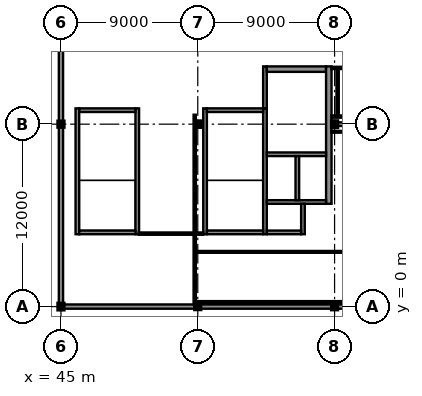
"""IFC4 building model, lengths in metres.
Left out: names, types, materials, properties, quantities, classifications, styles, units other than length and angle.
Written with IfcOpenShell. Run it as: python <this file> out.ifc"""

import sys

from ifc_helpers import new_model, si_unit, direction, frame, frame_2d, origin, origin_2d, place, context, subcontext, project, spatial, rectangle, i_section, extrude, element, fill, save


model = new_model("IFC4")
c1 = context("Model", 3, precision=1e-05, world=origin(), true_north=direction((0.0, 1.0)))
c2 = subcontext(c1, "Body", "Model", "MODEL_VIEW")
j1 = project(units=[si_unit("LENGTHUNIT", "METRE"), si_unit("PLANEANGLEUNIT", "RADIAN")], contexts=[c1])
p1 = place(None, origin())
s1 = spatial("IfcSite", under=j1, at=p1, CompositionType="ELEMENT")
p2 = place(p1, origin())
s2 = spatial("IfcBuilding", under=s1, at=p2, CompositionType="ELEMENT")
p3 = place(p2, frame((0.0, 0.0, 23.4)))
s3 = spatial("IfcBuildingStorey", under=s2, at=p3, CompositionType="ELEMENT", Elevation=23.4)
p4 = place(p3, frame((45.0, 0.0, 0.0), z_axis=(0.0, 0.0, 1.0), x_axis=(0.0, 1.0, 0.0)))
e1 = element("IfcColumn", 1, at=p4, inside=s3, PredefinedType="COLUMN", context=c2, shape_type="SweptSolid", body=[
    extrude(i_section(OverallWidth=0.3, OverallDepth=0.34, WebThickness=0.012, FlangeThickness=0.021, at=origin_2d()), origin(), (0.0, 0.0, 1.0), 4.0),
])
for number, where, z_axis, x_axis in (
    (2, (45.0, 12.0, 0.0), (0.0, 0.0, 1.0), (1.0, 0.0, 0.0)),
    (3, (54.0, 0.0, 0.0), (0.0, 0.0, 1.0), (1.0, 0.0, 0.0)),
):
    element("IfcColumn", number, at=place(p3, frame(where, z_axis=z_axis, x_axis=x_axis)), inside=s3, PredefinedType="COLUMN", context=c2, shape_type="SweptSolid", body=[
        extrude(i_section(OverallWidth=0.3, OverallDepth=0.3, WebThickness=0.011, FlangeThickness=0.019, at=origin_2d()), origin(), (0.0, 0.0, 1.0), 4.0),
    ])
for number, where, z_axis, x_axis in (
    (4, (54.0, 12.0, 0.0), (0.0, 0.0, 1.0), (1.0, 0.0, 0.0)),
    (5, (63.0, 0.0, 0.0), (0.0, 0.0, 1.0), (1.0, 0.0, 0.0)),
):
    element("IfcColumn", number, at=place(p3, frame(where, z_axis=z_axis, x_axis=x_axis)), inside=s3, PredefinedType="COLUMN", context=c2, shape_type="SweptSolid", body=[
        extrude(i_section(OverallWidth=0.3, OverallDepth=0.32, WebThickness=0.011, FlangeThickness=0.021, at=origin_2d()), origin(), (0.0, 0.0, 1.0), 4.0),
    ])
p5 = place(p3, frame((63.0, 12.0, 0.0), z_axis=(0.0, 0.0, 1.0), x_axis=(1.0, 0.0, 0.0)))
e6 = element("IfcColumn", 6, at=p5, inside=s3, PredefinedType="COLUMN", context=c2, shape_type="SweptSolid", body=[
    extrude(i_section(OverallWidth=0.3, OverallDepth=0.34, WebThickness=0.012, FlangeThickness=0.021, at=origin_2d()), origin(), (0.0, 0.0, 1.0), 4.0),
])
p6 = place(p3, frame((45.168, 0.0, 0.0), z_axis=(0.0, 0.0, 1.0), x_axis=(1.0, 0.0, 0.0)))
e7 = element("IfcWall", 7, at=p6, inside=s3, PredefinedType="SOLIDWALL", context=c2, shape_type="SweptSolid", body=[
    extrude(rectangle(XDim=8.824, YDim=0.28, at=frame_2d((4.412, 0.0))), origin(), (0.0, 0.0, 1.0), 2.747),
])
p7 = place(p6, frame((1.997, 0.0, 0.9)))
e8 = element("IfcOpeningElement", 8, at=p7, cuts=e7, PredefinedType="OPENING", context=c2, shape_type="SweptSolid", body=[
    extrude(rectangle(XDim=1.3, YDim=1.3, at=frame_2d((0.65, 0.65))), frame((0.0, 0.155, 0.0), z_axis=(0.0, -1.0, 0.0), x_axis=(1.0, 0.0, 0.0)), (0.0, 0.0, 1.0), 0.31),
])
p8 = place(p6, frame((5.527, 0.0, 0.9)))
e9 = element("IfcOpeningElement", 9, at=p8, cuts=e7, PredefinedType="OPENING", context=c2, shape_type="SweptSolid", body=[
    extrude(rectangle(XDim=1.3, YDim=1.3, at=frame_2d((0.65, 0.65))), frame((0.0, 0.155, 0.0), z_axis=(0.0, -1.0, 0.0), x_axis=(1.0, 0.0, 0.0)), (0.0, 0.0, 1.0), 0.31),
])
p9 = place(p3, frame((54.008, 0.0, 0.0), z_axis=(0.0, 0.0, 1.0), x_axis=(1.0, 0.0, 0.0)))
e10 = element("IfcWall", 10, at=p9, inside=s3, PredefinedType="SOLIDWALL", context=c2, shape_type="SweptSolid", body=[
    extrude(rectangle(XDim=8.984, YDim=0.28, at=frame_2d((4.492, 0.0))), origin(), (0.0, 0.0, 1.0), 2.747),
])
p10 = place(p9, frame((2.045, 0.0, 0.9)))
e11 = element("IfcOpeningElement", 11, at=p10, cuts=e10, PredefinedType="OPENING", context=c2, shape_type="SweptSolid", body=[
    extrude(rectangle(XDim=1.3, YDim=1.3, at=frame_2d((0.65, 0.65))), frame((0.0, 0.155, 0.0), z_axis=(0.0, -1.0, 0.0), x_axis=(1.0, 0.0, 0.0)), (0.0, 0.0, 1.0), 0.31),
])
p11 = place(p9, frame((5.639, 0.0, 0.9)))
e12 = element("IfcOpeningElement", 12, at=p11, cuts=e10, PredefinedType="OPENING", context=c2, shape_type="SweptSolid", body=[
    extrude(rectangle(XDim=1.3, YDim=1.3, at=frame_2d((0.65, 0.65))), frame((0.0, 0.155, 0.0), z_axis=(0.0, -1.0, 0.0), x_axis=(1.0, 0.0, 0.0)), (0.0, 0.0, 1.0), 0.31),
])
p12 = place(p3, frame((63.008, 0.0, 0.0), z_axis=(0.0, 0.0, 1.0), x_axis=(1.0, 0.0, 0.0)))
e13 = element("IfcWall", 13, at=p12, inside=s3, PredefinedType="SOLIDWALL", context=c2, shape_type="SweptSolid", body=[
    extrude(rectangle(XDim=8.984, YDim=0.28, at=frame_2d((4.492, 0.0))), origin(), (0.0, 0.0, 1.0), 2.747),
])
p13 = place(p12, frame((2.045, 0.0, 0.9)))
e14 = element("IfcOpeningElement", 14, at=p13, cuts=e13, PredefinedType="OPENING", context=c2, shape_type="SweptSolid", body=[
    extrude(rectangle(XDim=1.3, YDim=1.3, at=frame_2d((0.65, 0.65))), frame((0.0, 0.155, 0.0), z_axis=(0.0, -1.0, 0.0), x_axis=(1.0, 0.0, 0.0)), (0.0, 0.0, 1.0), 0.31),
])
p14 = place(p12, frame((5.639, 0.0, 0.9)))
e15 = element("IfcOpeningElement", 15, at=p14, cuts=e13, PredefinedType="OPENING", context=c2, shape_type="SweptSolid", body=[
    extrude(rectangle(XDim=1.3, YDim=1.3, at=frame_2d((0.65, 0.65))), frame((0.0, 0.155, 0.0), z_axis=(0.0, -1.0, 0.0), x_axis=(1.0, 0.0, 0.0)), (0.0, 0.0, 1.0), 0.31),
])
p15 = place(p3, frame((45.0, 23.677, 0.0), z_axis=(0.0, 0.0, 1.0), x_axis=(0.0, -1.0, 0.0)))
e16 = element("IfcWall", 16, at=p15, inside=s3, PredefinedType="SOLIDWALL", context=c2, shape_type="SweptSolid", body=[
    extrude(rectangle(XDim=11.529, YDim=0.28, at=frame_2d((5.765, 0.0))), origin(), (0.0, 0.0, 1.0), 3.155),
])
p16 = place(p15, frame((2.809, 0.0, 0.9)))
e17 = element("IfcOpeningElement", 17, at=p16, cuts=e16, PredefinedType="OPENING", context=c2, shape_type="SweptSolid", body=[
    extrude(rectangle(XDim=1.3, YDim=1.3, at=frame_2d((0.65, 0.65))), frame((0.0, 0.155, 0.0), z_axis=(0.0, -1.0, 0.0), x_axis=(1.0, 0.0, 0.0)), (0.0, 0.0, 1.0), 0.31),
])
p17 = place(p15, frame((8.117, 0.0, 0.9)))
e18 = element("IfcOpeningElement", 18, at=p17, cuts=e16, PredefinedType="OPENING", context=c2, shape_type="SweptSolid", body=[
    extrude(rectangle(XDim=1.3, YDim=1.3, at=frame_2d((0.65, 0.65))), frame((0.0, 0.155, 0.0), z_axis=(0.0, -1.0, 0.0), x_axis=(1.0, 0.0, 0.0)), (0.0, 0.0, 1.0), 0.31),
])
p18 = place(p3, frame((45.0, 11.852, 0.0), z_axis=(0.0, 0.0, 1.0), x_axis=(0.0, -1.0, 0.0)))
e19 = element("IfcWall", 19, at=p18, inside=s3, PredefinedType="SOLIDWALL", context=c2, shape_type="SweptSolid", body=[
    extrude(rectangle(XDim=11.844, YDim=0.28, at=frame_2d((5.922, 0.0))), origin(), (0.0, 0.0, 1.0), 3.155),
])
p19 = place(p18, frame((2.903, 0.0, 0.9)))
e20 = element("IfcOpeningElement", 20, at=p19, cuts=e19, PredefinedType="OPENING", context=c2, shape_type="SweptSolid", body=[
    extrude(rectangle(XDim=1.3, YDim=1.3, at=frame_2d((0.65, 0.65))), frame((0.0, 0.155, 0.0), z_axis=(0.0, -1.0, 0.0), x_axis=(1.0, 0.0, 0.0)), (0.0, 0.0, 1.0), 0.31),
])
p20 = place(p18, frame((7.641, 0.0, 0.9)))
e21 = element("IfcOpeningElement", 21, at=p20, cuts=e19, PredefinedType="OPENING", context=c2, shape_type="SweptSolid", body=[
    extrude(rectangle(XDim=1.3, YDim=1.3, at=frame_2d((0.65, 0.65))), frame((0.0, 0.155, 0.0), z_axis=(0.0, -1.0, 0.0), x_axis=(1.0, 0.0, 0.0)), (0.0, 0.0, 1.0), 0.31),
])
p21 = place(p3, frame((54.48, 4.76, 0.0), z_axis=(0.0, 0.0, 1.0), x_axis=(0.0, 1.0, 0.0)))
e22 = element("IfcWall", 22, at=p21, inside=s3, PredefinedType="SHEAR", context=c2, shape_type="SweptSolid", body=[
    extrude(rectangle(XDim=8.28, YDim=0.24, at=frame_2d((4.14, 0.0))), origin(), (0.0, 0.0, 1.0), 3.81),
])
p22 = place(p3, frame((58.42, 4.76, 0.0), z_axis=(0.0, 0.0, 1.0), x_axis=(0.0, 1.0, 0.0)))
e23 = element("IfcWall", 23, at=p22, inside=s3, PredefinedType="SHEAR", context=c2, shape_type="SweptSolid", body=[
    extrude(rectangle(XDim=8.28, YDim=0.24, at=frame_2d((4.14, 0.0))), origin(), (0.0, 0.0, 1.0), 3.81),
])
p23 = place(p22, frame((6.49, 0.0, 0.0)))
e24 = element("IfcOpeningElement", 24, at=p23, cuts=e23, PredefinedType="OPENING", context=c2, shape_type="SweptSolid", body=[
    extrude(rectangle(XDim=1.3, YDim=2.2, at=frame_2d((0.65, 1.1))), frame((0.0, 0.135, 0.0), z_axis=(0.0, -1.0, 0.0), x_axis=(1.0, 0.0, 0.0)), (0.0, 0.0, 1.0), 0.27),
])
for number, where, z_axis, x_axis in (
    (25, (54.6, 4.88, 0.0), (0.0, 0.0, 1.0), (1.0, 0.0, 0.0)),
    (26, (54.6, 12.92, 0.0), (0.0, 0.0, 1.0), (1.0, 0.0, 0.0)),
):
    element("IfcWall", number, at=place(p3, frame(where, z_axis=z_axis, x_axis=x_axis)), inside=s3, PredefinedType="SHEAR", context=c2, shape_type="SweptSolid", body=[
        extrude(rectangle(XDim=3.7, YDim=0.24, at=frame_2d((1.85, 0.0))), origin(), (0.0, 0.0, 1.0), 3.81),
    ])
p24 = place(p3, frame((46.08, 4.76, 0.0), z_axis=(0.0, 0.0, 1.0), x_axis=(0.0, 1.0, 0.0)))
e27 = element("IfcWall", 27, at=p24, inside=s3, PredefinedType="SHEAR", context=c2, shape_type="SweptSolid", body=[
    extrude(rectangle(XDim=8.28, YDim=0.24, at=frame_2d((4.14, 0.0))), origin(), (0.0, 0.0, 1.0), 3.81),
])
p25 = place(p3, frame((50.02, 4.76, 0.0), z_axis=(0.0, 0.0, 1.0), x_axis=(0.0, 1.0, 0.0)))
e28 = element("IfcWall", 28, at=p25, inside=s3, PredefinedType="SHEAR", context=c2, shape_type="SweptSolid", body=[
    extrude(rectangle(XDim=8.28, YDim=0.24, at=frame_2d((4.14, 0.0))), origin(), (0.0, 0.0, 1.0), 3.81),
])
p26 = place(p25, frame((6.49, 0.0, 0.0)))
e29 = element("IfcOpeningElement", 29, at=p26, cuts=e28, PredefinedType="OPENING", context=c2, shape_type="SweptSolid", body=[
    extrude(rectangle(XDim=1.3, YDim=2.2, at=frame_2d((0.65, 1.1))), frame((0.0, 0.135, 0.0), z_axis=(0.0, -1.0, 0.0), x_axis=(1.0, 0.0, 0.0)), (0.0, 0.0, 1.0), 0.27),
])
for number, where, z_axis, x_axis in (
    (30, (46.2, 4.88, 0.0), (0.0, 0.0, 1.0), (1.0, 0.0, 0.0)),
    (31, (46.2, 12.92, 0.0), (0.0, 0.0, 1.0), (1.0, 0.0, 0.0)),
):
    element("IfcWall", number, at=place(p3, frame(where, z_axis=z_axis, x_axis=x_axis)), inside=s3, PredefinedType="SHEAR", context=c2, shape_type="SweptSolid", body=[
        extrude(rectangle(XDim=3.7, YDim=0.24, at=frame_2d((1.85, 0.0))), origin(), (0.0, 0.0, 1.0), 3.81),
    ])
p27 = place(p3, frame((58.42, 13.04, 0.0), z_axis=(0.0, 0.0, 1.0), x_axis=(0.0, 1.0, 0.0)))
e32 = element("IfcWall", 32, at=p27, inside=s3, PredefinedType="SHEAR", context=c2, shape_type="SweptSolid", body=[
    extrude(rectangle(XDim=2.76, YDim=0.24, at=frame_2d((1.38, 0.0))), origin(), (0.0, 0.0, 1.0), 3.66),
])
p28 = place(p3, frame((58.54, 15.62, 0.0), z_axis=(0.0, 0.0, 1.0), x_axis=(1.0, 0.0, 0.0)))
e33 = element("IfcWall", 33, at=p28, inside=s3, PredefinedType="SHEAR", context=c2, shape_type="SweptSolid", body=[
    extrude(rectangle(XDim=3.9, YDim=0.36, at=frame_2d((1.95, 0.0))), origin(), (0.0, 0.0, 1.0), 3.66),
])
p29 = place(p28, frame((1.15, 0.0, 0.0)))
e34 = element("IfcOpeningElement", 34, at=p29, cuts=e33, PredefinedType="OPENING", context=c2, shape_type="SweptSolid", body=[
    extrude(rectangle(XDim=1.6, YDim=2.25, at=frame_2d((0.8, 1.125))), frame((0.0, 0.195, 0.0), z_axis=(0.0, -1.0, 0.0), x_axis=(1.0, 0.0, 0.0)), (0.0, 0.0, 1.0), 0.39),
])
p30 = place(p3, frame((62.62, 6.76, 0.0), z_axis=(0.0, 0.0, 1.0), x_axis=(0.0, 1.0, 0.0)))
e35 = element("IfcWall", 35, at=p30, inside=s3, PredefinedType="SHEAR", context=c2, shape_type="SweptSolid", body=[
    extrude(rectangle(XDim=9.04, YDim=0.36, at=frame_2d((4.52, 0.0))), origin(), (0.0, 0.0, 1.0), 3.66),
])
p31 = place(p3, frame((58.54, 10.02, 0.0), z_axis=(0.0, 0.0, 1.0), x_axis=(1.0, 0.0, 0.0)))
e36 = element("IfcWall", 36, at=p31, inside=s3, PredefinedType="SHEAR", context=c2, shape_type="SweptSolid", body=[
    extrude(rectangle(XDim=3.9, YDim=0.24, at=frame_2d((1.95, 0.0))), origin(), (0.0, 0.0, 1.0), 3.81),
])
p32 = place(p31, frame((0.235, 0.0, 0.0)))
e37 = element("IfcOpeningElement", 37, at=p32, cuts=e36, PredefinedType="OPENING", context=c2, shape_type="SweptSolid", body=[
    extrude(rectangle(XDim=1.6, YDim=2.3, at=frame_2d((0.8, 1.15))), frame((0.0, 0.135, 0.0), z_axis=(0.0, -1.0, 0.0), x_axis=(1.0, 0.0, 0.0)), (0.0, 0.0, 1.0), 0.27),
])
p33 = place(p31, frame((2.185, 0.0, 0.0)))
e38 = element("IfcOpeningElement", 38, at=p33, cuts=e36, PredefinedType="OPENING", context=c2, shape_type="SweptSolid", body=[
    extrude(rectangle(XDim=1.6, YDim=2.3, at=frame_2d((0.8, 1.15))), frame((0.0, 0.135, 0.0), z_axis=(0.0, -1.0, 0.0), x_axis=(1.0, 0.0, 0.0)), (0.0, 0.0, 1.0), 0.27),
])
p34 = place(p3, frame((58.54, 6.88, 0.0), z_axis=(0.0, 0.0, 1.0), x_axis=(1.0, 0.0, 0.0)))
e39 = element("IfcWall", 39, at=p34, inside=s3, PredefinedType="SHEAR", context=c2, shape_type="SweptSolid", body=[
    extrude(rectangle(XDim=3.9, YDim=0.24, at=frame_2d((1.95, 0.0))), origin(), (0.0, 0.0, 1.0), 3.81),
])
p35 = place(p3, frame((60.55, 7.0, 0.0), z_axis=(0.0, 0.0, 1.0), x_axis=(0.0, 1.0, 0.0)))
e40 = element("IfcWall", 40, at=p35, inside=s3, PredefinedType="SHEAR", context=c2, shape_type="SweptSolid", body=[
    extrude(rectangle(XDim=2.9, YDim=0.24, at=frame_2d((1.45, 0.0))), origin(), (0.0, 0.0, 1.0), 3.81),
])
p36 = place(p3, frame((60.92, 4.76, 0.0), z_axis=(0.0, 0.0, 1.0), x_axis=(0.0, 1.0, 0.0)))
e41 = element("IfcWall", 41, at=p36, inside=s3, PredefinedType="SHEAR", context=c2, shape_type="SweptSolid", body=[
    extrude(rectangle(XDim=2.0, YDim=0.24, at=frame_2d((1.0, 0.0))), origin(), (0.0, 0.0, 1.0), 3.81),
])
p37 = place(p3, frame((58.54, 4.88, 0.0), z_axis=(0.0, 0.0, 1.0), x_axis=(1.0, 0.0, 0.0)))
e42 = element("IfcWall", 42, at=p37, inside=s3, PredefinedType="SHEAR", context=c2, shape_type="SweptSolid", body=[
    extrude(rectangle(XDim=2.26, YDim=0.24, at=frame_2d((1.13, 0.0))), origin(), (0.0, 0.0, 1.0), 3.81),
])
p38 = place(p3, frame((63.008, 12.0, 0.0), z_axis=(0.0, 0.0, 1.0), x_axis=(1.0, 0.0, 0.0)))
e43 = element("IfcWall", 43, at=p38, inside=s3, PredefinedType="SHEAR", context=c2, shape_type="SweptSolid", body=[
    extrude(rectangle(XDim=8.844, YDim=0.24, at=frame_2d((4.422, 0.0))), origin(), (0.0, 0.0, 1.0), 2.845),
])
p39 = place(p3, frame((50.113, 4.8, 0.0), z_axis=(0.0, 0.0, 1.0), x_axis=(1.0, 0.0, 0.0)))
e44 = element("IfcWall", 44, at=p39, inside=s3, PredefinedType="PARTITIONING", context=c2, shape_type="SweptSolid", body=[
    extrude(rectangle(XDim=4.252, YDim=0.15, at=frame_2d((2.126, 0.0))), origin(), (0.0, 0.0, 1.0), 3.64),
])
p40 = place(p39, frame((1.601, 0.0, 0.0)))
e45 = element("IfcOpeningElement", 45, at=p40, cuts=e44, PredefinedType="OPENING", context=c2, shape_type="SweptSolid", body=[
    extrude(rectangle(XDim=1.05, YDim=2.25, at=frame_2d((0.525, 1.125))), frame((0.0, 0.09, 0.0), z_axis=(0.0, -1.0, 0.0), x_axis=(1.0, 0.0, 0.0)), (0.0, 0.0, 1.0), 0.18),
])
p41 = place(p3, frame((53.8, 4.73, 0.0), z_axis=(0.0, 0.0, 1.0), x_axis=(0.0, -1.0, 0.0)))
e46 = element("IfcWall", 46, at=p41, inside=s3, PredefinedType="PARTITIONING", context=c2, shape_type="SweptSolid", body=[
    extrude(rectangle(XDim=4.582, YDim=0.15, at=frame_2d((2.291, 0.0))), origin(), (0.0, 0.0, 1.0), 3.405),
])
p42 = place(p3, frame((107.721, 0.3, 0.0), z_axis=(0.0, 0.0, 1.0), x_axis=(-1.0, 0.0, 0.0)))
e47 = element("IfcWall", 47, at=p42, inside=s3, PredefinedType="PARTITIONING", context=c2, shape_type="SweptSolid", body=[
    extrude(rectangle(XDim=53.913, YDim=0.12, at=frame_2d((26.957, 0.0))), origin(), (0.0, 0.0, 1.0), 3.64),
])
p43 = place(p3, frame((53.87, 3.6, 0.0), z_axis=(0.0, 0.0, 1.0), x_axis=(1.0, 0.0, 0.0)))
e48 = element("IfcWall", 48, at=p43, inside=s3, PredefinedType="PARTITIONING", context=c2, shape_type="SweptSolid", body=[
    extrude(rectangle(XDim=63.25, YDim=0.12, at=frame_2d((31.625, 0.0))), origin(), (0.0, 0.0, 1.0), 3.64),
])
p44 = place(p43, frame((19.855, 0.0, 0.0)))
e49 = element("IfcOpeningElement", 49, at=p44, cuts=e48, PredefinedType="OPENING", context=c2, shape_type="SweptSolid", body=[
    extrude(rectangle(XDim=0.95, YDim=2.15, at=frame_2d((0.475, 1.075))), frame((0.0, 0.075, 0.0), z_axis=(0.0, -1.0, 0.0), x_axis=(1.0, 0.0, 0.0)), (0.0, 0.0, 1.0), 0.15),
])
p45 = place(p3, frame((53.8, 12.62, 0.0), z_axis=(0.0, 0.0, 1.0), x_axis=(0.0, -1.0, 0.0)))
e50 = element("IfcWall", 50, at=p45, inside=s3, PredefinedType="PARTITIONING", context=c2, shape_type="SweptSolid", body=[
    extrude(rectangle(XDim=7.75, YDim=0.15, at=frame_2d((3.875, 0.0))), origin(), (0.0, 0.0, 1.0), 3.405),
])
p46 = place(p3, frame((62.795, 11.5, 0.0), z_axis=(0.0, 0.0, 1.0), x_axis=(1.0, 0.0, 0.0)))
e51 = element("IfcWall", 51, at=p46, inside=s3, PredefinedType="PARTITIONING", context=c2, shape_type="SweptSolid", body=[
    extrude(rectangle(XDim=9.425, YDim=0.12, at=frame_2d((4.712, 0.0))), origin(), (0.0, 0.0, 1.0), 3.64),
])
p47 = place(p3, frame((72.22, 12.5, 0.0), z_axis=(0.0, 0.0, 1.0), x_axis=(-1.0, 0.0, 0.0)))
e52 = element("IfcWall", 52, at=p47, inside=s3, PredefinedType="PARTITIONING", context=c2, shape_type="SweptSolid", body=[
    extrude(rectangle(XDim=9.425, YDim=0.15, at=frame_2d((4.712, 0.0))), origin(), (0.0, 0.0, 1.0), 3.64),
])
p48 = place(p3, frame((63.2, 12.57, 0.0), z_axis=(0.0, 0.0, 1.0), x_axis=(0.0, 1.0, 0.0)))
e53 = element("IfcWall", 53, at=p48, inside=s3, PredefinedType="PARTITIONING", context=c2, shape_type="SweptSolid", body=[
    extrude(rectangle(XDim=3.05, YDim=0.15, at=frame_2d((1.525, 0.0))), origin(), (0.0, 0.0, 1.0), 3.365),
])
p49 = place(p3, frame((62.795, 15.7, 0.0), z_axis=(0.0, 0.0, 1.0), x_axis=(1.0, 0.0, 0.0)))
e54 = element("IfcWall", 54, at=p49, inside=s3, PredefinedType="PARTITIONING", context=c2, shape_type="SweptSolid", body=[
    extrude(rectangle(XDim=9.425, YDim=0.15, at=frame_2d((4.712, 0.0))), origin(), (0.0, 0.0, 1.0), 3.64),
])
p50 = place(p49, frame((4.187, 0.0, 0.0)))
e55 = element("IfcOpeningElement", 55, at=p50, cuts=e54, PredefinedType="OPENING", context=c2, shape_type="SweptSolid", body=[
    extrude(rectangle(XDim=1.05, YDim=2.25, at=frame_2d((0.525, 1.125))), frame((0.0, 0.09, 0.0), z_axis=(0.0, -1.0, 0.0), x_axis=(1.0, 0.0, 0.0)), (0.0, 0.0, 1.0), 0.18),
])
p51 = place(p7, origin())
e56 = element("IfcWindow", 56, at=p51, inside=s3, PartitioningType="SINGLE_PANEL", PredefinedType="WINDOW", context=c2, shape_type="SweptSolid", body=[
    extrude(rectangle(XDim=1.3, YDim=1.3, at=frame_2d((0.65, 0.65))), frame((0.0, 0.03, 0.0), z_axis=(0.0, -1.0, 0.0), x_axis=(1.0, 0.0, 0.0)), (0.0, 0.0, 1.0), 0.06),
])
fill(e8, e56)
p52 = place(p8, origin())
e57 = element("IfcWindow", 57, at=p52, inside=s3, PartitioningType="SINGLE_PANEL", PredefinedType="WINDOW", context=c2, shape_type="SweptSolid", body=[
    extrude(rectangle(XDim=1.3, YDim=1.3, at=frame_2d((0.65, 0.65))), frame((0.0, 0.03, 0.0), z_axis=(0.0, -1.0, 0.0), x_axis=(1.0, 0.0, 0.0)), (0.0, 0.0, 1.0), 0.06),
])
fill(e9, e57)
p53 = place(p10, origin())
e58 = element("IfcWindow", 58, at=p53, inside=s3, PartitioningType="SINGLE_PANEL", PredefinedType="WINDOW", context=c2, shape_type="SweptSolid", body=[
    extrude(rectangle(XDim=1.3, YDim=1.3, at=frame_2d((0.65, 0.65))), frame((0.0, 0.03, 0.0), z_axis=(0.0, -1.0, 0.0), x_axis=(1.0, 0.0, 0.0)), (0.0, 0.0, 1.0), 0.06),
])
fill(e11, e58)
p54 = place(p11, origin())
e59 = element("IfcWindow", 59, at=p54, inside=s3, PartitioningType="SINGLE_PANEL", PredefinedType="WINDOW", context=c2, shape_type="SweptSolid", body=[
    extrude(rectangle(XDim=1.3, YDim=1.3, at=frame_2d((0.65, 0.65))), frame((0.0, 0.03, 0.0), z_axis=(0.0, -1.0, 0.0), x_axis=(1.0, 0.0, 0.0)), (0.0, 0.0, 1.0), 0.06),
])
fill(e12, e59)
p55 = place(p17, origin())
e60 = element("IfcWindow", 60, at=p55, inside=s3, PartitioningType="SINGLE_PANEL", PredefinedType="WINDOW", context=c2, shape_type="SweptSolid", body=[
    extrude(rectangle(XDim=1.3, YDim=1.3, at=frame_2d((0.65, 0.65))), frame((0.0, 0.03, 0.0), z_axis=(0.0, -1.0, 0.0), x_axis=(1.0, 0.0, 0.0)), (0.0, 0.0, 1.0), 0.06),
])
fill(e18, e60)
p56 = place(p19, origin())
e61 = element("IfcWindow", 61, at=p56, inside=s3, PartitioningType="SINGLE_PANEL", PredefinedType="WINDOW", context=c2, shape_type="SweptSolid", body=[
    extrude(rectangle(XDim=1.3, YDim=1.3, at=frame_2d((0.65, 0.65))), frame((0.0, 0.03, 0.0), z_axis=(0.0, -1.0, 0.0), x_axis=(1.0, 0.0, 0.0)), (0.0, 0.0, 1.0), 0.06),
])
fill(e20, e61)
p57 = place(p20, origin())
e62 = element("IfcWindow", 62, at=p57, inside=s3, PartitioningType="SINGLE_PANEL", PredefinedType="WINDOW", context=c2, shape_type="SweptSolid", body=[
    extrude(rectangle(XDim=1.3, YDim=1.3, at=frame_2d((0.65, 0.65))), frame((0.0, 0.03, 0.0), z_axis=(0.0, -1.0, 0.0), x_axis=(1.0, 0.0, 0.0)), (0.0, 0.0, 1.0), 0.06),
])
fill(e21, e62)
p58 = place(p23, frame((1.3, 0.0, 0.0), z_axis=(0.0, 0.0, 1.0), x_axis=(-1.0, 0.0, 0.0)))
e63 = element("IfcDoor", 63, at=p58, inside=s3, OperationType="SINGLE_SWING_LEFT", PredefinedType="DOOR", context=c2, shape_type="SweptSolid", body=[
    extrude(rectangle(XDim=1.3, YDim=2.2, at=frame_2d((0.65, 1.1))), frame((0.0, 0.025, 0.0), z_axis=(0.0, -1.0, 0.0), x_axis=(1.0, 0.0, 0.0)), (0.0, 0.0, 1.0), 0.05),
])
fill(e24, e63)
p59 = place(p26, frame((1.3, 0.0, 0.0), z_axis=(0.0, 0.0, 1.0), x_axis=(-1.0, 0.0, 0.0)))
e64 = element("IfcDoor", 64, at=p59, inside=s3, OperationType="SINGLE_SWING_LEFT", PredefinedType="DOOR", context=c2, shape_type="SweptSolid", body=[
    extrude(rectangle(XDim=1.3, YDim=2.2, at=frame_2d((0.65, 1.1))), frame((0.0, 0.025, 0.0), z_axis=(0.0, -1.0, 0.0), x_axis=(1.0, 0.0, 0.0)), (0.0, 0.0, 1.0), 0.05),
])
fill(e29, e64)
p60 = place(p29, origin())
e65 = element("IfcDoor", 65, at=p60, inside=s3, OperationType="DOUBLE_DOOR_SINGLE_SWING", PredefinedType="DOOR", context=c2, shape_type="SweptSolid", body=[
    extrude(rectangle(XDim=1.6, YDim=2.25, at=frame_2d((0.8, 1.125))), frame((0.0, 0.025, 0.0), z_axis=(0.0, -1.0, 0.0), x_axis=(1.0, 0.0, 0.0)), (0.0, 0.0, 1.0), 0.05),
])
fill(e34, e65)
p61 = place(p32, origin())
e66 = element("IfcDoor", 66, at=p61, inside=s3, OperationType="DOUBLE_DOOR_SLIDING", PredefinedType="DOOR", context=c2, shape_type="SweptSolid", body=[
    extrude(rectangle(XDim=1.6, YDim=2.3, at=frame_2d((0.8, 1.15))), frame((0.0, 0.025, 0.0), z_axis=(0.0, -1.0, 0.0), x_axis=(1.0, 0.0, 0.0)), (0.0, 0.0, 1.0), 0.05),
])
fill(e37, e66)
p62 = place(p33, origin())
e67 = element("IfcDoor", 67, at=p62, inside=s3, OperationType="DOUBLE_DOOR_SLIDING", PredefinedType="DOOR", context=c2, shape_type="SweptSolid", body=[
    extrude(rectangle(XDim=1.6, YDim=2.3, at=frame_2d((0.8, 1.15))), frame((0.0, 0.025, 0.0), z_axis=(0.0, -1.0, 0.0), x_axis=(1.0, 0.0, 0.0)), (0.0, 0.0, 1.0), 0.05),
])
fill(e38, e67)
p63 = place(p40, origin())
e68 = element("IfcDoor", 68, at=p63, inside=s3, OperationType="SINGLE_SWING_LEFT", PredefinedType="DOOR", context=c2, shape_type="SweptSolid", body=[
    extrude(rectangle(XDim=1.05, YDim=2.25, at=frame_2d((0.525, 1.125))), frame((0.0, 0.025, 0.0), z_axis=(0.0, -1.0, 0.0), x_axis=(1.0, 0.0, 0.0)), (0.0, 0.0, 1.0), 0.05),
])
fill(e45, e68)
save(model, sys.argv[1])
